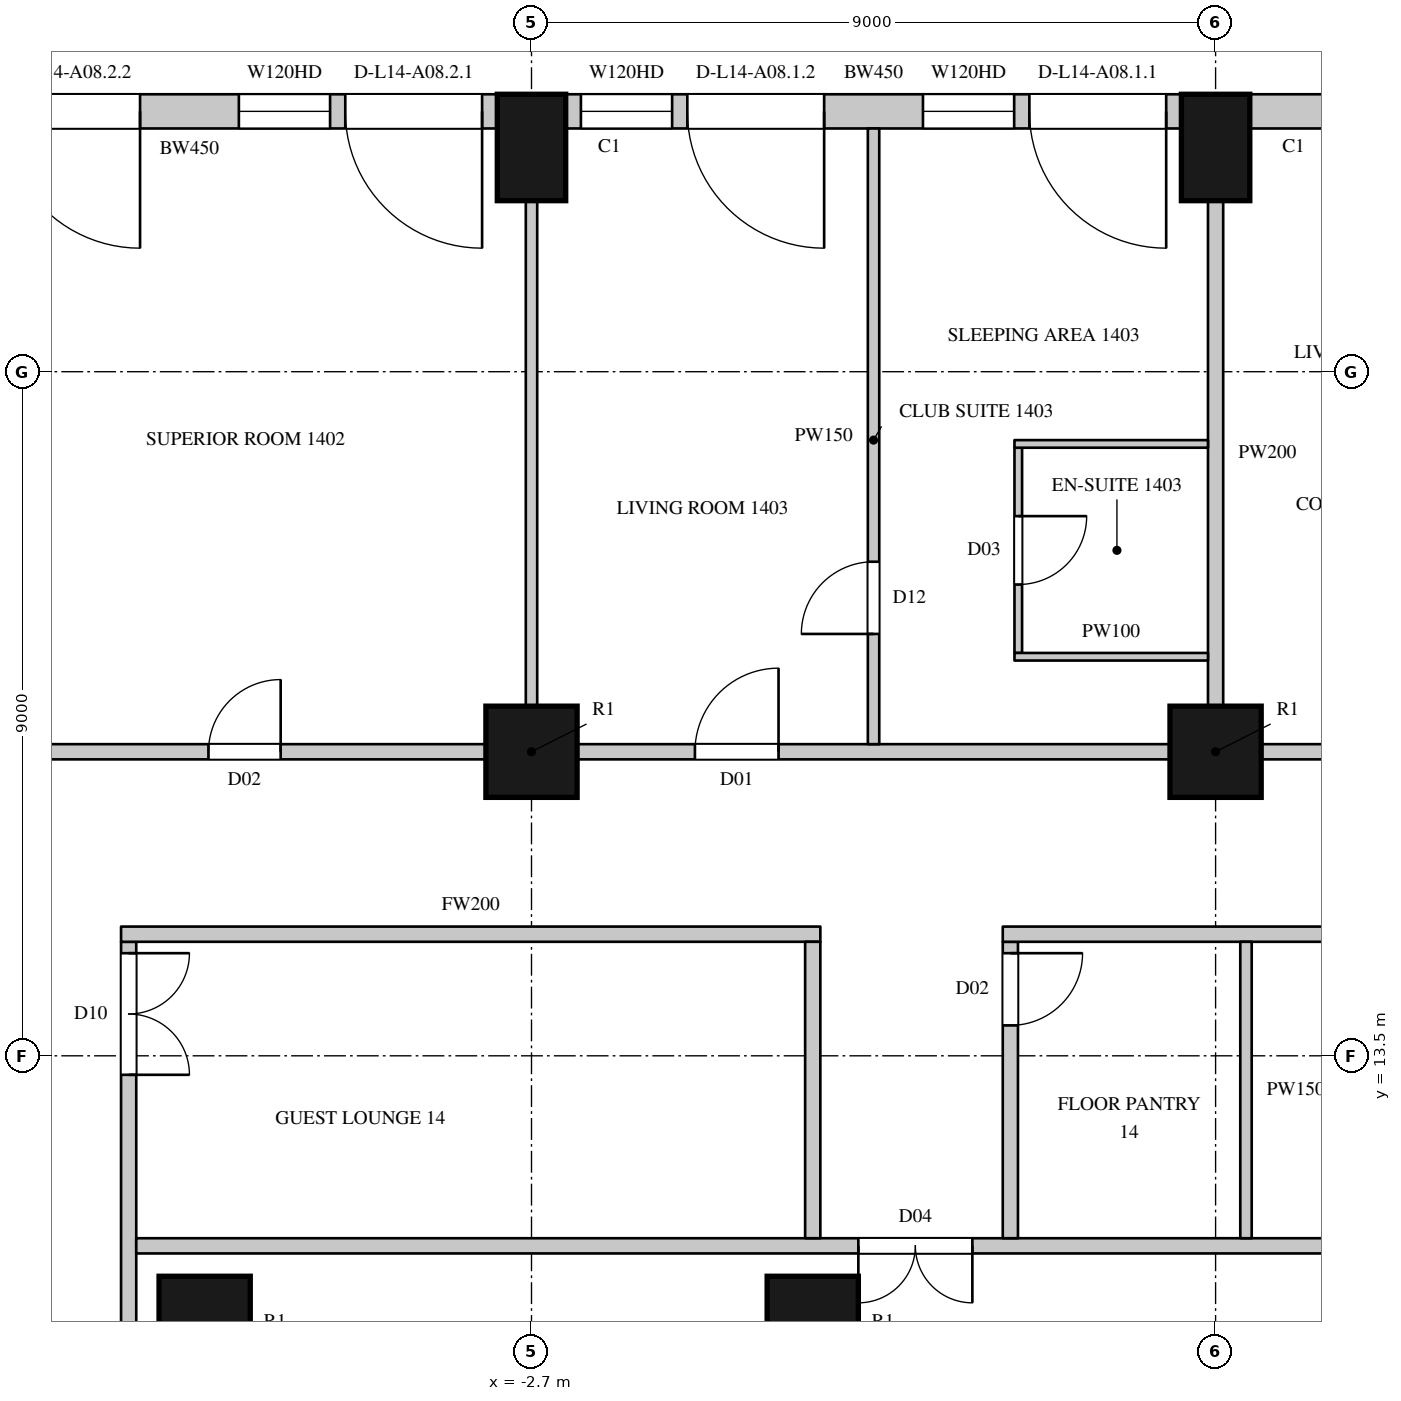
"""IFC4 building model, lengths in metres.
Left out: names, types, materials, properties, quantities, classifications, styles, units other than length and angle.
Written with IfcOpenShell. Run it as: python <this file> out.ifc"""

import sys

from ifc_helpers import new_model, si_unit, direction, frame, frame_2d, origin, origin_2d, place, context, subcontext, project, spatial, rectangle, circle, extrude, element, fill, save


model = new_model("IFC4")
c1 = context("Model", 3, precision=1e-05, world=origin(), true_north=direction((0.0, 1.0)))
c2 = subcontext(c1, "Body", "Model", "MODEL_VIEW")
j1 = project(units=[si_unit("LENGTHUNIT", "METRE"), si_unit("PLANEANGLEUNIT", "RADIAN")], contexts=[c1])
p1 = place(None, origin())
s1 = spatial("IfcSite", under=j1, at=p1, CompositionType="ELEMENT")
p2 = place(p1, origin())
s2 = spatial("IfcBuilding", under=s1, at=p2, CompositionType="ELEMENT")
p3 = place(p2, frame((0.0, 0.0, 80.7)))
s3 = spatial("IfcBuildingStorey", under=s2, at=p3, CompositionType="ELEMENT", Elevation=80.7)
for number, where, z_axis, x_axis in (
    (1, (6.3, 25.45, 0.0), (0.0, 0.0, 1.0), (-1.0, 0.0, 0.0)),
    (2, (-2.7, 25.45, 0.0), (0.0, 0.0, 1.0), (-1.0, 0.0, 0.0)),
):
    element("IfcColumn", number, at=place(p3, frame(where, z_axis=z_axis, x_axis=x_axis)), inside=s3, PredefinedType="COLUMN", context=c2, shape_type="SweptSolid", body=[
        extrude(rectangle(XDim=0.9, YDim=1.4, at=origin_2d()), origin(), (0.0, 0.0, 1.0), 3.6),
    ])
for number, where, z_axis, x_axis in (
    (3, (-2.7, 17.5, 0.0), (0.0, 0.0, 1.0), (1.0, 0.0, 0.0)),
    (4, (6.3, 17.5, 0.0), (0.0, 0.0, 1.0), (1.0, 0.0, 0.0)),
    (5, (-7.0, 10.0, 0.0), (0.0, 0.0, 1.0), (1.0, 0.0, 0.0)),
    (6, (1.0, 10.0, 0.0), (0.0, 0.0, 1.0), (1.0, 0.0, 0.0)),
):
    element("IfcColumn", number, at=place(p3, frame(where, z_axis=z_axis, x_axis=x_axis)), inside=s3, PredefinedType="COLUMN", context=c2, shape_type="SweptSolid", body=[
        extrude(circle(Radius=0.6, at=origin_2d()), origin(), (0.0, 0.0, 1.0), 3.6),
    ])
p4 = place(p3, frame((11.989, 25.925, 0.0), z_axis=(0.0, 0.0, 1.0), x_axis=(-1.0, 0.0, 0.0)))
e7 = element("IfcWall", 7, at=p4, inside=s3, PredefinedType="SOLIDWALL", context=c2, shape_type="SweptSolid", body=[
    extrude(rectangle(XDim=5.239, YDim=0.45, at=frame_2d((2.619, 0.0))), origin(), (0.0, 0.0, 1.0), 3.3),
])
p5 = place(p4, frame((1.77, 0.0, 1.05)))
e8 = element("IfcOpeningElement", 8, at=p5, cuts=e7, PredefinedType="OPENING", context=c2, shape_type="SweptSolid", body=[
    extrude(rectangle(XDim=2.1, YDim=2.0, at=frame_2d((1.05, 1.0))), frame((0.0, 0.235, 0.0), z_axis=(0.0, -1.0, 0.0), x_axis=(1.0, 0.0, 0.0)), (0.0, 0.0, 1.0), 0.47),
])
p6 = place(p3, frame((5.85, 25.925, 0.0), z_axis=(0.0, 0.0, 1.0), x_axis=(-1.0, 0.0, 0.0)))
e9 = element("IfcWall", 9, at=p6, inside=s3, PredefinedType="SOLIDWALL", context=c2, shape_type="SweptSolid", body=[
    extrude(rectangle(XDim=8.1, YDim=0.45, at=frame_2d((4.05, 0.0))), origin(), (0.0, 0.0, 1.0), 3.3),
])
p7 = place(p6, frame((0.2, 0.0, 0.0)))
e10 = element("IfcOpeningElement", 10, at=p7, cuts=e9, PredefinedType="OPENING", context=c2, shape_type="SweptSolid", body=[
    extrude(rectangle(XDim=1.8, YDim=2.4, at=frame_2d((0.9, 1.2))), frame((0.0, 0.235, 0.0), z_axis=(0.0, -1.0, 0.0), x_axis=(1.0, 0.0, 0.0)), (0.0, 0.0, 1.0), 0.47),
])
p8 = place(p6, frame((2.2, 0.0, 1.05)))
e11 = element("IfcOpeningElement", 11, at=p8, cuts=e9, PredefinedType="OPENING", context=c2, shape_type="SweptSolid", body=[
    extrude(rectangle(XDim=1.2, YDim=2.0, at=frame_2d((0.6, 1.0))), frame((0.0, 0.235, 0.0), z_axis=(0.0, -1.0, 0.0), x_axis=(1.0, 0.0, 0.0)), (0.0, 0.0, 1.0), 0.47),
])
p9 = place(p6, frame((4.7, 0.0, 0.0)))
e12 = element("IfcOpeningElement", 12, at=p9, cuts=e9, PredefinedType="OPENING", context=c2, shape_type="SweptSolid", body=[
    extrude(rectangle(XDim=1.8, YDim=2.4, at=frame_2d((0.9, 1.2))), frame((0.0, 0.235, 0.0), z_axis=(0.0, -1.0, 0.0), x_axis=(1.0, 0.0, 0.0)), (0.0, 0.0, 1.0), 0.47),
])
p10 = place(p6, frame((6.7, 0.0, 1.05)))
e13 = element("IfcOpeningElement", 13, at=p10, cuts=e9, PredefinedType="OPENING", context=c2, shape_type="SweptSolid", body=[
    extrude(rectangle(XDim=1.2, YDim=2.0, at=frame_2d((0.6, 1.0))), frame((0.0, 0.235, 0.0), z_axis=(0.0, -1.0, 0.0), x_axis=(1.0, 0.0, 0.0)), (0.0, 0.0, 1.0), 0.47),
])
p11 = place(p3, frame((-3.15, 25.925, 0.0), z_axis=(0.0, 0.0, 1.0), x_axis=(-1.0, 0.0, 0.0)))
e14 = element("IfcWall", 14, at=p11, inside=s3, PredefinedType="SOLIDWALL", context=c2, shape_type="SweptSolid", body=[
    extrude(rectangle(XDim=8.1, YDim=0.45, at=frame_2d((4.05, 0.0))), origin(), (0.0, 0.0, 1.0), 3.3),
])
p12 = place(p11, frame((0.2, 0.0, 0.0)))
e15 = element("IfcOpeningElement", 15, at=p12, cuts=e14, PredefinedType="OPENING", context=c2, shape_type="SweptSolid", body=[
    extrude(rectangle(XDim=1.8, YDim=2.4, at=frame_2d((0.9, 1.2))), frame((0.0, 0.235, 0.0), z_axis=(0.0, -1.0, 0.0), x_axis=(1.0, 0.0, 0.0)), (0.0, 0.0, 1.0), 0.47),
])
p13 = place(p11, frame((2.2, 0.0, 1.05)))
e16 = element("IfcOpeningElement", 16, at=p13, cuts=e14, PredefinedType="OPENING", context=c2, shape_type="SweptSolid", body=[
    extrude(rectangle(XDim=1.2, YDim=2.0, at=frame_2d((0.6, 1.0))), frame((0.0, 0.235, 0.0), z_axis=(0.0, -1.0, 0.0), x_axis=(1.0, 0.0, 0.0)), (0.0, 0.0, 1.0), 0.47),
])
p14 = place(p11, frame((4.7, 0.0, 0.0)))
e17 = element("IfcOpeningElement", 17, at=p14, cuts=e14, PredefinedType="OPENING", context=c2, shape_type="SweptSolid", body=[
    extrude(rectangle(XDim=1.8, YDim=2.4, at=frame_2d((0.9, 1.2))), frame((0.0, 0.235, 0.0), z_axis=(0.0, -1.0, 0.0), x_axis=(1.0, 0.0, 0.0)), (0.0, 0.0, 1.0), 0.47),
])
p15 = place(p11, frame((6.7, 0.0, 1.05)))
e18 = element("IfcOpeningElement", 18, at=p15, cuts=e14, PredefinedType="OPENING", context=c2, shape_type="SweptSolid", body=[
    extrude(rectangle(XDim=1.2, YDim=2.0, at=frame_2d((0.6, 1.0))), frame((0.0, 0.235, 0.0), z_axis=(0.0, -1.0, 0.0), x_axis=(1.0, 0.0, 0.0)), (0.0, 0.0, 1.0), 0.47),
])
p16 = place(p3, frame((-11.1, 17.5, 0.0), z_axis=(0.0, 0.0, 1.0), x_axis=(1.0, 0.0, 0.0)))
e19 = element("IfcWall", 19, at=p16, inside=s3, PredefinedType="PARTITIONING", context=c2, shape_type="SweptSolid", body=[
    extrude(rectangle(XDim=7.8, YDim=0.2, at=frame_2d((3.9, 0.0))), origin(), (0.0, 0.0, 1.0), 2.75),
])
p17 = place(p16, frame((4.15, 0.0, 0.0)))
e20 = element("IfcOpeningElement", 20, at=p17, cuts=e19, PredefinedType="OPENING", context=c2, shape_type="SweptSolid", body=[
    extrude(rectangle(XDim=0.95, YDim=2.2, at=frame_2d((0.475, 1.1))), frame((0.0, 0.11, 0.0), z_axis=(0.0, -1.0, 0.0), x_axis=(1.0, 0.0, 0.0)), (0.0, 0.0, 1.0), 0.22),
])
p18 = place(p3, frame((-2.1, 17.5, 0.0), z_axis=(0.0, 0.0, 1.0), x_axis=(1.0, 0.0, 0.0)))
e21 = element("IfcWall", 21, at=p18, inside=s3, PredefinedType="PARTITIONING", context=c2, shape_type="SweptSolid", body=[
    extrude(rectangle(XDim=7.8, YDim=0.2, at=frame_2d((3.9, 0.0))), origin(), (0.0, 0.0, 1.0), 2.75),
])
p19 = place(p18, frame((1.55, 0.0, 0.0)))
e22 = element("IfcOpeningElement", 22, at=p19, cuts=e21, PredefinedType="OPENING", context=c2, shape_type="SweptSolid", body=[
    extrude(rectangle(XDim=1.1, YDim=2.4, at=frame_2d((0.55, 1.2))), frame((0.0, 0.11, 0.0), z_axis=(0.0, -1.0, 0.0), x_axis=(1.0, 0.0, 0.0)), (0.0, 0.0, 1.0), 0.22),
])
p20 = place(p3, frame((6.9, 17.5, 0.0), z_axis=(0.0, 0.0, 1.0), x_axis=(1.0, 0.0, 0.0)))
e23 = element("IfcWall", 23, at=p20, inside=s3, PredefinedType="PARTITIONING", context=c2, shape_type="SweptSolid", body=[
    extrude(rectangle(XDim=7.8, YDim=0.2, at=frame_2d((3.9, 0.0))), origin(), (0.0, 0.0, 1.0), 2.75),
])
p21 = place(p20, frame((1.45, 0.0, 0.0)))
e24 = element("IfcOpeningElement", 24, at=p21, cuts=e23, PredefinedType="OPENING", context=c2, shape_type="SweptSolid", body=[
    extrude(rectangle(XDim=1.1, YDim=2.4, at=frame_2d((0.55, 1.2))), frame((0.0, 0.11, 0.0), z_axis=(0.0, -1.0, 0.0), x_axis=(1.0, 0.0, 0.0)), (0.0, 0.0, 1.0), 0.22),
])
p22 = place(p3, frame((-8.0, -10.9, 0.0), z_axis=(0.0, 0.0, 1.0), x_axis=(0.0, 1.0, 0.0)))
e25 = element("IfcWall", 25, at=p22, inside=s3, PredefinedType="PARTITIONING", context=c2, shape_type="SweptSolid", body=[
    extrude(rectangle(XDim=25.9, YDim=0.2, at=frame_2d((12.95, 0.0))), origin(), (0.0, 0.0, 1.0), 3.3),
])
p23 = place(p22, frame((14.65, 0.0, 0.0)))
e26 = element("IfcOpeningElement", 26, at=p23, cuts=e25, PredefinedType="OPENING", context=c2, shape_type="SweptSolid", body=[
    extrude(rectangle(XDim=1.5, YDim=2.2, at=frame_2d((0.75, 1.1))), frame((0.0, 0.11, 0.0), z_axis=(0.0, -1.0, 0.0), x_axis=(1.0, 0.0, 0.0)), (0.0, 0.0, 1.0), 0.22),
])
p24 = place(p22, frame((24.15, 0.0, 0.0)))
e27 = element("IfcOpeningElement", 27, at=p24, cuts=e25, PredefinedType="OPENING", context=c2, shape_type="SweptSolid", body=[
    extrude(rectangle(XDim=1.6, YDim=2.4, at=frame_2d((0.8, 1.2))), frame((0.0, 0.11, 0.0), z_axis=(0.0, -1.0, 0.0), x_axis=(1.0, 0.0, 0.0)), (0.0, 0.0, 1.0), 0.22),
])
p25 = place(p3, frame((-7.9, 11.0, 0.0), z_axis=(0.0, 0.0, 1.0), x_axis=(1.0, 0.0, 0.0)))
e28 = element("IfcWall", 28, at=p25, inside=s3, PredefinedType="PARTITIONING", context=c2, shape_type="SweptSolid", body=[
    extrude(rectangle(XDim=17.9, YDim=0.2, at=frame_2d((8.95, 0.0))), origin(), (0.0, 0.0, 1.0), 3.3),
])
p26 = place(p25, frame((9.5, 0.0, 0.0)))
e29 = element("IfcOpeningElement", 29, at=p26, cuts=e28, PredefinedType="OPENING", context=c2, shape_type="SweptSolid", body=[
    extrude(rectangle(XDim=1.5, YDim=2.2, at=frame_2d((0.75, 1.1))), frame((0.0, 0.11, 0.0), z_axis=(0.0, -1.0, 0.0), x_axis=(1.0, 0.0, 0.0)), (0.0, 0.0, 1.0), 0.22),
])
p27 = place(p3, frame((-8.1, 15.1, 0.0), z_axis=(0.0, 0.0, 1.0), x_axis=(1.0, 0.0, 0.0)))
e30 = element("IfcWall", 30, at=p27, inside=s3, PredefinedType="PARTITIONING", context=c2, shape_type="SweptSolid", body=[
    extrude(rectangle(XDim=9.2, YDim=0.2, at=frame_2d((4.6, 0.0))), origin(), (0.0, 0.0, 1.0), 3.3),
])
p28 = place(p3, frame((1.0, 11.1, 0.0), z_axis=(0.0, 0.0, 1.0), x_axis=(0.0, 1.0, 0.0)))
e31 = element("IfcWall", 31, at=p28, inside=s3, PredefinedType="PARTITIONING", context=c2, shape_type="SweptSolid", body=[
    extrude(rectangle(XDim=3.9, YDim=0.2, at=frame_2d((1.95, 0.0))), origin(), (0.0, 0.0, 1.0), 3.3),
])
p29 = place(p3, frame((3.6, 11.1, 0.0), z_axis=(0.0, 0.0, 1.0), x_axis=(0.0, 1.0, 0.0)))
e32 = element("IfcWall", 32, at=p29, inside=s3, PredefinedType="PARTITIONING", context=c2, shape_type="SweptSolid", body=[
    extrude(rectangle(XDim=3.9, YDim=0.2, at=frame_2d((1.95, 0.0))), origin(), (0.0, 0.0, 1.0), 3.3),
])
p30 = place(p29, frame((2.8, 0.0, 0.0)))
e33 = element("IfcOpeningElement", 33, at=p30, cuts=e32, PredefinedType="OPENING", context=c2, shape_type="SweptSolid", body=[
    extrude(rectangle(XDim=0.95, YDim=2.2, at=frame_2d((0.475, 1.1))), frame((0.0, 0.11, 0.0), z_axis=(0.0, -1.0, 0.0), x_axis=(1.0, 0.0, 0.0)), (0.0, 0.0, 1.0), 0.22),
])
p31 = place(p3, frame((3.5, 15.1, 0.0), z_axis=(0.0, 0.0, 1.0), x_axis=(1.0, 0.0, 0.0)))
e34 = element("IfcWall", 34, at=p31, inside=s3, PredefinedType="PARTITIONING", context=c2, shape_type="SweptSolid", body=[
    extrude(rectangle(XDim=10.3, YDim=0.2, at=frame_2d((5.15, 0.0))), origin(), (0.0, 0.0, 1.0), 3.3),
])
p32 = place(p31, frame((6.2, 0.0, 0.0)))
e35 = element("IfcOpeningElement", 35, at=p32, cuts=e34, PredefinedType="OPENING", context=c2, shape_type="SweptSolid", body=[
    extrude(rectangle(XDim=0.95, YDim=2.2, at=frame_2d((0.475, 1.1))), frame((0.0, 0.11, 0.0), z_axis=(0.0, -1.0, 0.0), x_axis=(1.0, 0.0, 0.0)), (0.0, 0.0, 1.0), 0.22),
])
p33 = place(p3, frame((-2.7, 18.1, 0.0), z_axis=(0.0, 0.0, 1.0), x_axis=(0.0, 1.0, 0.0)))
e36 = element("IfcWall", 36, at=p33, inside=s3, PredefinedType="PARTITIONING", context=c2, shape_type="SweptSolid", body=[
    extrude(rectangle(XDim=6.65, YDim=0.15, at=frame_2d((3.325, 0.0))), origin(), (0.0, 0.0, 1.0), 2.75),
])
p34 = place(p3, frame((1.8, 17.6, 0.0), z_axis=(0.0, 0.0, 1.0), x_axis=(0.0, 1.0, 0.0)))
e37 = element("IfcWall", 37, at=p34, inside=s3, PredefinedType="PARTITIONING", context=c2, shape_type="SweptSolid", body=[
    extrude(rectangle(XDim=8.1, YDim=0.15, at=frame_2d((4.05, 0.0))), origin(), (0.0, 0.0, 1.0), 2.65),
])
p35 = place(p34, frame((1.45, 0.0, 0.0)))
e38 = element("IfcOpeningElement", 38, at=p35, cuts=e37, PredefinedType="OPENING", context=c2, shape_type="SweptSolid", body=[
    extrude(rectangle(XDim=0.95, YDim=2.2, at=frame_2d((0.475, 1.1))), frame((0.0, 0.085, 0.0), z_axis=(0.0, -1.0, 0.0), x_axis=(1.0, 0.0, 0.0)), (0.0, 0.0, 1.0), 0.17),
])
p36 = place(p3, frame((6.7, 11.1, 0.0), z_axis=(0.0, 0.0, 1.0), x_axis=(0.0, 1.0, 0.0)))
e39 = element("IfcWall", 39, at=p36, inside=s3, PredefinedType="PARTITIONING", context=c2, shape_type="SweptSolid", body=[
    extrude(rectangle(XDim=3.9, YDim=0.15, at=frame_2d((1.95, 0.0))), origin(), (0.0, 0.0, 1.0), 3.3),
])
p37 = place(p3, frame((6.3, 18.1, 0.0), z_axis=(0.0, 0.0, 1.0), x_axis=(0.0, 1.0, 0.0)))
e40 = element("IfcWall", 40, at=p37, inside=s3, PredefinedType="PARTITIONING", context=c2, shape_type="SweptSolid", body=[
    extrude(rectangle(XDim=6.65, YDim=0.2, at=frame_2d((3.325, 0.0))), origin(), (0.0, 0.0, 1.0), 2.75),
])
p38 = place(p3, frame((3.704, 18.8, 0.0), z_axis=(0.0, 0.0, 1.0), x_axis=(0.0, 1.0, 0.0)))
e41 = element("IfcWall", 41, at=p38, inside=s3, PredefinedType="PARTITIONING", context=c2, shape_type="SweptSolid", body=[
    extrude(rectangle(XDim=2.7, YDim=0.1, at=frame_2d((1.35, 0.0))), origin(), (0.0, 0.0, 1.0), 3.3),
])
p39 = place(p38, frame((0.9, 0.0, 0.0)))
e42 = element("IfcOpeningElement", 42, at=p39, cuts=e41, PredefinedType="OPENING", context=c2, shape_type="SweptSolid", body=[
    extrude(rectangle(XDim=0.9, YDim=2.2, at=frame_2d((0.45, 1.1))), frame((0.0, 0.06, 0.0), z_axis=(0.0, -1.0, 0.0), x_axis=(1.0, 0.0, 0.0)), (0.0, 0.0, 1.0), 0.12),
])
for number, where, z_axis, x_axis in (
    (43, (3.654, 18.75, 0.0), (0.0, 0.0, 1.0), (1.0, 0.0, 0.0)),
    (44, (3.654, 21.55, 0.0), (0.0, 0.0, 1.0), (1.0, 0.0, 0.0)),
):
    element("IfcWall", number, at=place(p3, frame(where, z_axis=z_axis, x_axis=x_axis)), inside=s3, PredefinedType="PARTITIONING", context=c2, shape_type="SweptSolid", body=[
        extrude(rectangle(XDim=2.546, YDim=0.1, at=frame_2d((1.273, 0.0))), origin(), (0.0, 0.0, 1.0), 3.3),
    ])
p40 = place(p7, origin())
e45 = element("IfcDoor", 45, at=p40, inside=s3, OperationType="SLIDING_TO_LEFT", PredefinedType="DOOR", context=c2, shape_type="SweptSolid", body=[
    extrude(rectangle(XDim=1.8, YDim=2.4, at=frame_2d((0.9, 1.2))), frame((0.0, 0.13, 0.0), z_axis=(0.0, -1.0, 0.0), x_axis=(1.0, 0.0, 0.0)), (0.0, 0.0, 1.0), 0.05),
])
fill(e10, e45)
p41 = place(p8, origin())
e46 = element("IfcWindow", 46, at=p41, inside=s3, PartitioningType="SINGLE_PANEL", PredefinedType="WINDOW", context=c2, shape_type="SweptSolid", body=[
    extrude(rectangle(XDim=1.2, YDim=2.0, at=frame_2d((0.6, 1.0))), frame((0.0, 0.135, 0.0), z_axis=(0.0, -1.0, 0.0), x_axis=(1.0, 0.0, 0.0)), (0.0, 0.0, 1.0), 0.06),
])
fill(e11, e46)
p42 = place(p9, origin())
e47 = element("IfcDoor", 47, at=p42, inside=s3, OperationType="SLIDING_TO_LEFT", PredefinedType="DOOR", context=c2, shape_type="SweptSolid", body=[
    extrude(rectangle(XDim=1.8, YDim=2.4, at=frame_2d((0.9, 1.2))), frame((0.0, 0.13, 0.0), z_axis=(0.0, -1.0, 0.0), x_axis=(1.0, 0.0, 0.0)), (0.0, 0.0, 1.0), 0.05),
])
fill(e12, e47)
p43 = place(p10, origin())
e48 = element("IfcWindow", 48, at=p43, inside=s3, PartitioningType="SINGLE_PANEL", PredefinedType="WINDOW", context=c2, shape_type="SweptSolid", body=[
    extrude(rectangle(XDim=1.2, YDim=2.0, at=frame_2d((0.6, 1.0))), frame((0.0, 0.135, 0.0), z_axis=(0.0, -1.0, 0.0), x_axis=(1.0, 0.0, 0.0)), (0.0, 0.0, 1.0), 0.06),
])
fill(e13, e48)
p44 = place(p12, origin())
e49 = element("IfcDoor", 49, at=p44, inside=s3, OperationType="SLIDING_TO_LEFT", PredefinedType="DOOR", context=c2, shape_type="SweptSolid", body=[
    extrude(rectangle(XDim=1.8, YDim=2.4, at=frame_2d((0.9, 1.2))), frame((0.0, 0.13, 0.0), z_axis=(0.0, -1.0, 0.0), x_axis=(1.0, 0.0, 0.0)), (0.0, 0.0, 1.0), 0.05),
])
fill(e15, e49)
p45 = place(p13, origin())
e50 = element("IfcWindow", 50, at=p45, inside=s3, PartitioningType="SINGLE_PANEL", PredefinedType="WINDOW", context=c2, shape_type="SweptSolid", body=[
    extrude(rectangle(XDim=1.2, YDim=2.0, at=frame_2d((0.6, 1.0))), frame((0.0, 0.135, 0.0), z_axis=(0.0, -1.0, 0.0), x_axis=(1.0, 0.0, 0.0)), (0.0, 0.0, 1.0), 0.06),
])
fill(e16, e50)
p46 = place(p14, origin())
e51 = element("IfcDoor", 51, at=p46, inside=s3, OperationType="SLIDING_TO_LEFT", PredefinedType="DOOR", context=c2, shape_type="SweptSolid", body=[
    extrude(rectangle(XDim=1.8, YDim=2.4, at=frame_2d((0.9, 1.2))), frame((0.0, 0.13, 0.0), z_axis=(0.0, -1.0, 0.0), x_axis=(1.0, 0.0, 0.0)), (0.0, 0.0, 1.0), 0.05),
])
fill(e17, e51)
p47 = place(p26, origin())
e52 = element("IfcDoor", 52, at=p47, inside=s3, OperationType="DOUBLE_DOOR_SINGLE_SWING", PredefinedType="DOOR", context=c2, shape_type="SweptSolid", body=[
    extrude(rectangle(XDim=1.5, YDim=2.2, at=frame_2d((0.75, 1.1))), frame((0.0, 0.025, 0.0), z_axis=(0.0, -1.0, 0.0), x_axis=(1.0, 0.0, 0.0)), (0.0, 0.0, 1.0), 0.05),
])
fill(e29, e52)
p48 = place(p24, origin())
e53 = element("IfcDoor", 53, at=p48, inside=s3, OperationType="DOUBLE_DOOR_SINGLE_SWING", PredefinedType="DOOR", context=c2, shape_type="SweptSolid", body=[
    extrude(rectangle(XDim=1.6, YDim=2.4, at=frame_2d((0.8, 1.2))), frame((0.0, 0.025, 0.0), z_axis=(0.0, -1.0, 0.0), x_axis=(1.0, 0.0, 0.0)), (0.0, 0.0, 1.0), 0.05),
])
fill(e27, e53)
p49 = place(p30, origin())
e54 = element("IfcDoor", 54, at=p49, inside=s3, OperationType="SINGLE_SWING_LEFT", PredefinedType="DOOR", context=c2, shape_type="SweptSolid", body=[
    extrude(rectangle(XDim=0.95, YDim=2.2, at=frame_2d((0.475, 1.1))), frame((0.0, 0.025, 0.0), z_axis=(0.0, -1.0, 0.0), x_axis=(1.0, 0.0, 0.0)), (0.0, 0.0, 1.0), 0.05),
])
fill(e33, e54)
p50 = place(p17, origin())
e55 = element("IfcDoor", 55, at=p50, inside=s3, OperationType="SINGLE_SWING_RIGHT", PredefinedType="DOOR", context=c2, shape_type="SweptSolid", body=[
    extrude(rectangle(XDim=0.95, YDim=2.2, at=frame_2d((0.475, 1.1))), frame((0.0, 0.025, 0.0), z_axis=(0.0, -1.0, 0.0), x_axis=(1.0, 0.0, 0.0)), (0.0, 0.0, 1.0), 0.05),
])
fill(e20, e55)
p51 = place(p19, origin())
e56 = element("IfcDoor", 56, at=p51, inside=s3, OperationType="SINGLE_SWING_RIGHT", PredefinedType="DOOR", context=c2, shape_type="SweptSolid", body=[
    extrude(rectangle(XDim=1.1, YDim=2.4, at=frame_2d((0.55, 1.2))), frame((0.0, 0.025, 0.0), z_axis=(0.0, -1.0, 0.0), x_axis=(1.0, 0.0, 0.0)), (0.0, 0.0, 1.0), 0.05),
])
fill(e22, e56)
p52 = place(p35, origin())
e57 = element("IfcDoor", 57, at=p52, inside=s3, OperationType="SINGLE_SWING_LEFT", PredefinedType="DOOR", context=c2, shape_type="SweptSolid", body=[
    extrude(rectangle(XDim=0.95, YDim=2.2, at=frame_2d((0.475, 1.1))), frame((0.0, 0.025, 0.0), z_axis=(0.0, -1.0, 0.0), x_axis=(1.0, 0.0, 0.0)), (0.0, 0.0, 1.0), 0.05),
])
fill(e38, e57)
p53 = place(p39, origin())
e58 = element("IfcDoor", 58, at=p53, inside=s3, OperationType="SINGLE_SWING_LEFT", PredefinedType="DOOR", context=c2, shape_type="SweptSolid", body=[
    extrude(rectangle(XDim=0.9, YDim=2.2, at=frame_2d((0.45, 1.1))), frame((0.0, 0.025, 0.0), z_axis=(0.0, -1.0, 0.0), x_axis=(1.0, 0.0, 0.0)), (0.0, 0.0, 1.0), 0.05),
])
fill(e42, e58)
save(model, sys.argv[1])
